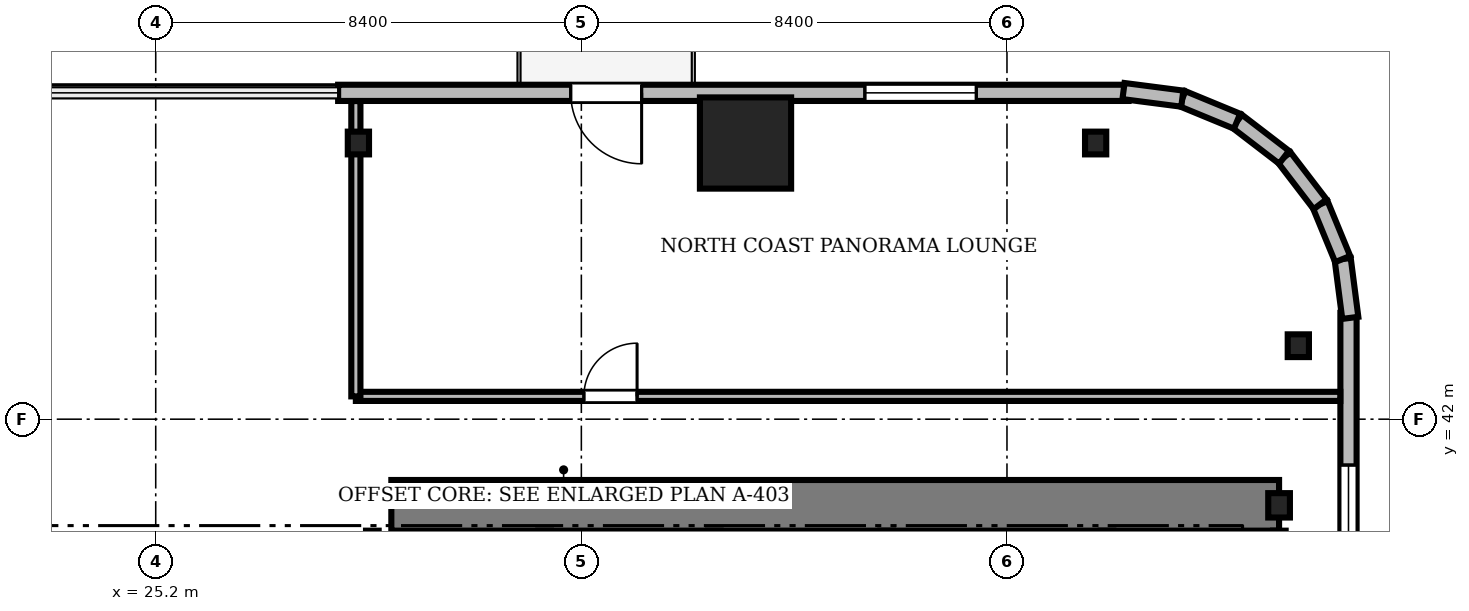
"""IFC4 building model, lengths in metres.
Left out: names, types, materials, properties, quantities, classifications, styles, units other than length and angle.
Written with IfcOpenShell. Run it as: python <this file> out.ifc"""

import sys

from ifc_helpers import new_model, si_unit, direction, frame, frame_2d, origin, origin_2d, place, context, subcontext, project, spatial, rectangle, i_section, extrude, source, transform, mapped, element, fill, save


model = new_model("IFC4")
c1 = context("Model", 3, precision=1e-05, world=origin(), true_north=direction((0.0, 1.0)))
c2 = subcontext(c1, "Body", "Model", "MODEL_VIEW")
j1 = project(units=[si_unit("LENGTHUNIT", "METRE"), si_unit("PLANEANGLEUNIT", "RADIAN")], contexts=[c1])
p1 = place(None, origin())
s1 = spatial("IfcSite", under=j1, at=p1, CompositionType="ELEMENT")
p2 = place(p1, origin())
s2 = spatial("IfcBuilding", under=s1, at=p2, CompositionType="ELEMENT")
p3 = place(p2, frame((0.0, 0.0, 31.25)))
s3 = spatial("IfcBuildingStorey", under=s2, at=p3, CompositionType="ELEMENT", Elevation=31.25)
m1 = source(origin(), c2, "Body", "SweptSolid", [
    extrude(rectangle(XDim=17.52, YDim=1.0, at=frame_2d((8.76, 0.0))), origin(), (0.0, 0.0, 1.0), 3.41),
])
p4 = place(p3, frame((29.85, 40.3, 0.0), z_axis=(0.0, 0.0, 1.0), x_axis=(1.0, 0.0, 0.0)))
e1 = element("IfcWall", 1, at=p4, inside=s3, PredefinedType="SHEAR", context=c2, shape_type="MappedRepresentation", body=[
    mapped(m1, transform((0.0, 0.0, 0.0), scale=1.0)),
])
m2 = source(origin(), c2, "Body", "SweptSolid", [
    extrude(i_section(OverallWidth=0.428, OverallDepth=0.481, WebThickness=0.04, FlangeThickness=0.063, FilletRadius=0.015, at=origin_2d()), origin(), (0.0, 0.0, 1.0), 3.41),
])
p5 = place(p3, frame((47.37, 40.3, 0.0), z_axis=(0.0, 0.0, 1.0), x_axis=(1.0, 0.0, 0.0)))
e2 = element("IfcColumn", 2, at=p5, inside=s3, PredefinedType="COLUMN", context=c2, shape_type="MappedRepresentation", body=[
    mapped(m2, transform((0.0, 0.0, 0.0), scale=1.0)),
])
m3 = source(origin(), c2, "Body", "SweptSolid", [
    extrude(rectangle(XDim=1.8, YDim=1.8, at=origin_2d()), origin(), (0.0, 0.0, 1.0), 3.41),
])
p6 = place(p3, frame((36.84, 47.45, 0.0), z_axis=(0.0, 0.0, 1.0), x_axis=(1.0, 0.0, 0.0)))
e3 = element("IfcColumn", 3, at=p6, inside=s3, PredefinedType="COLUMN", context=c2, shape_type="MappedRepresentation", body=[
    mapped(m3, transform((0.0, 0.0, 0.0), scale=1.0)),
])
m4 = source(origin(), c2, "Body", "SweptSolid", [
    extrude(i_section(OverallWidth=0.419, OverallDepth=0.449, WebThickness=0.031, FlangeThickness=0.048, FilletRadius=0.015, at=origin_2d()), origin(), (0.0, 0.0, 1.0), 3.41),
])
for number, where, z_axis, x_axis in (
    (4, (47.75, 43.45, 0.0), (0.0, 0.0, 1.0), (1.0, 0.0, 0.0)),
    (5, (43.75, 47.45, 0.0), (0.0, 0.0, 1.0), (1.0, 0.0, 0.0)),
    (6, (29.2, 47.45, 0.0), (0.0, 0.0, 1.0), (1.0, 0.0, 0.0)),
):
    element("IfcColumn", number, at=place(p3, frame(where, z_axis=z_axis, x_axis=x_axis)), inside=s3, PredefinedType="COLUMN", context=c2, shape_type="MappedRepresentation", body=[
        mapped(m4, transform((0.0, 0.0, 0.0), scale=1.0)),
    ])
m5 = source(origin(), c2, "Body", "SweptSolid", [
    extrude(rectangle(XDim=15.6, YDim=0.32, at=frame_2d((7.8, 0.0))), origin(), (0.0, 0.0, 1.0), 3.41),
])
p7 = place(p3, frame((44.4, 48.44, 0.0), z_axis=(0.0, 0.0, 1.0), x_axis=(-1.0, 0.0, 0.0)))
e7 = element("IfcWall", 7, at=p7, inside=s3, PredefinedType="SOLIDWALL", context=c2, shape_type="MappedRepresentation", body=[
    mapped(m5, transform((0.0, 0.0, 0.0), scale=1.0)),
])
m6 = source(origin(), c2, "Body", "SweptSolid", [
    extrude(rectangle(XDim=1.4, YDim=2.3, at=frame_2d((0.7, 1.15))), frame((0.0, 0.17, 0.0), z_axis=(0.0, -1.0, 0.0), x_axis=(1.0, 0.0, 0.0)), (0.0, 0.0, 1.0), 0.34),
])
p8 = place(p7, frame((9.61, 0.0, 0.0)))
e8 = element("IfcOpeningElement", 8, at=p8, cuts=e7, PredefinedType="OPENING", context=c2, shape_type="MappedRepresentation", body=[
    mapped(m6, transform((0.0, 0.0, 0.0), scale=1.0)),
])
m7 = source(origin(), c2, "Body", "SweptSolid", [
    extrude(rectangle(XDim=2.2, YDim=2.4, at=frame_2d((1.1, 1.2))), frame((0.0, 0.17, 0.0), z_axis=(0.0, -1.0, 0.0), x_axis=(1.0, 0.0, 0.0)), (0.0, 0.0, 1.0), 0.34),
])
p9 = place(p7, frame((3.005, 0.0, 0.72)))
e9 = element("IfcOpeningElement", 9, at=p9, cuts=e7, PredefinedType="OPENING", context=c2, shape_type="MappedRepresentation", body=[
    mapped(m7, transform((0.0, 0.0, 0.0), scale=1.0)),
])
m8 = source(origin(), c2, "Body", "SweptSolid", [
    extrude(rectangle(XDim=15.6, YDim=0.32, at=frame_2d((7.8, 0.0))), origin(), (0.0, 0.0, 1.0), 3.41),
])
p10 = place(p3, frame((48.74, 28.5, 0.0), z_axis=(0.0, 0.0, 1.0), x_axis=(0.0, 1.0, 0.0)))
e10 = element("IfcWall", 10, at=p10, inside=s3, PredefinedType="SOLIDWALL", context=c2, shape_type="MappedRepresentation", body=[
    mapped(m8, transform((0.0, 0.0, 0.0), scale=1.0)),
])
p11 = place(p10, frame((10.395, 0.0, 0.72)))
e11 = element("IfcOpeningElement", 11, at=p11, cuts=e10, PredefinedType="OPENING", context=c2, shape_type="MappedRepresentation", body=[
    mapped(m7, transform((0.0, 0.0, 0.0), scale=1.0)),
])
m9 = source(origin(), c2, "Body", "SweptSolid", [
    extrude(rectangle(XDim=1.17, YDim=0.32, at=frame_2d((0.585, 0.0))), origin(), (0.0, 0.0, 1.0), 3.41),
])
p12 = place(p3, frame((48.776, 44.0, 0.0), z_axis=(0.0, 0.0, 1.0), x_axis=(-0.128295670475, 0.991735963317, 0.0)))
e12 = element("IfcWall", 12, at=p12, inside=s3, PredefinedType="SOLIDWALL", context=c2, shape_type="MappedRepresentation", body=[
    mapped(m9, transform((0.0, 0.0, 0.0), scale=1.0)),
])
m10 = source(origin(), c2, "Body", "SweptSolid", [
    extrude(rectangle(XDim=1.169, YDim=0.32, at=frame_2d((0.584, 0.0))), origin(), (0.0, 0.0, 1.0), 3.41),
])
p13 = place(p3, frame((48.625, 45.16, 0.0), z_axis=(0.0, 0.0, 1.0), x_axis=(-0.381054331552, 0.924552646638, 0.0)))
e13 = element("IfcWall", 13, at=p13, inside=s3, PredefinedType="SOLIDWALL", context=c2, shape_type="MappedRepresentation", body=[
    mapped(m10, transform((0.0, 0.0, 0.0), scale=1.0)),
])
m11 = source(origin(), c2, "Body", "SweptSolid", [
    extrude(rectangle(XDim=1.169, YDim=0.32, at=frame_2d((0.584, 0.0))), origin(), (0.0, 0.0, 1.0), 3.41),
])
p14 = place(p3, frame((48.18, 46.241, 0.0), z_axis=(0.0, 0.0, 1.0), x_axis=(-0.608387696831, 0.793639975269, 0.0)))
e14 = element("IfcWall", 14, at=p14, inside=s3, PredefinedType="SOLIDWALL", context=c2, shape_type="MappedRepresentation", body=[
    mapped(m11, transform((0.0, 0.0, 0.0), scale=1.0)),
])
m12 = source(origin(), c2, "Body", "SweptSolid", [
    extrude(rectangle(XDim=1.169, YDim=0.32, at=frame_2d((0.584, 0.0))), origin(), (0.0, 0.0, 1.0), 3.41),
])
p15 = place(p3, frame((47.469, 47.169, 0.0), z_axis=(0.0, 0.0, 1.0), x_axis=(-0.793663520347, 0.608356981114, 0.0)))
e15 = element("IfcWall", 15, at=p15, inside=s3, PredefinedType="SOLIDWALL", context=c2, shape_type="MappedRepresentation", body=[
    mapped(m12, transform((0.0, 0.0, 0.0), scale=1.0)),
])
p16 = place(p3, frame((46.541, 47.88, 0.0), z_axis=(0.0, 0.0, 1.0), x_axis=(-0.924552646638, 0.381054331552, 0.0)))
e16 = element("IfcWall", 16, at=p16, inside=s3, PredefinedType="SOLIDWALL", context=c2, shape_type="MappedRepresentation", body=[
    mapped(m10, transform((0.0, 0.0, 0.0), scale=1.0)),
])
p17 = place(p3, frame((45.46, 48.325, 0.0), z_axis=(0.0, 0.0, 1.0), x_axis=(-0.991735963317, 0.128295670475, 0.0)))
e17 = element("IfcWall", 17, at=p17, inside=s3, PredefinedType="SOLIDWALL", context=c2, shape_type="MappedRepresentation", body=[
    mapped(m9, transform((0.0, 0.0, 0.0), scale=1.0)),
])
m13 = source(origin(), c2, "Body", "SweptSolid", [
    extrude(rectangle(XDim=9.15, YDim=0.25, at=frame_2d((4.575, 0.0))), origin(), (0.0, 0.0, 1.0), 3.45),
])
for number, where, z_axis, x_axis in (
    (18, (29.475, 30.65, 0.0), (0.0, 0.0, 1.0), (0.0, 1.0, 0.0)),
    (19, (32.875, 30.65, 0.0), (0.0, 0.0, 1.0), (0.0, 1.0, 0.0)),
    (20, (36.225, 30.65, 0.0), (0.0, 0.0, 1.0), (0.0, 1.0, 0.0)),
    (21, (39.625, 30.65, 0.0), (0.0, 0.0, 1.0), (0.0, 1.0, 0.0)),
    (22, (43.975, 30.65, 0.0), (0.0, 0.0, 1.0), (0.0, 1.0, 0.0)),
    (23, (47.375, 30.65, 0.0), (0.0, 0.0, 1.0), (0.0, 1.0, 0.0)),
):
    element("IfcWall", number, at=place(p3, frame(where, z_axis=z_axis, x_axis=x_axis)), inside=s3, PredefinedType="SOLIDWALL", context=c2, shape_type="MappedRepresentation", body=[
        mapped(m13, transform((0.0, 0.0, 0.0), scale=1.0)),
    ])
m14 = source(origin(), c2, "Body", "SweptSolid", [
    extrude(rectangle(XDim=19.428, YDim=0.18, at=frame_2d((9.714, 0.0))), origin(), (0.0, 0.0, 1.0), 2.652),
])
p18 = place(p3, frame((29.15, 42.45, 0.0), z_axis=(0.0, 0.0, 1.0), x_axis=(1.0, 0.0, 0.0)))
e24 = element("IfcWall", 24, at=p18, inside=s3, PredefinedType="PARTITIONING", context=c2, shape_type="MappedRepresentation", body=[
    mapped(m14, transform((0.0, 0.0, 0.0), scale=1.0)),
])
m15 = source(origin(), c2, "Body", "SweptSolid", [
    extrude(rectangle(XDim=1.05, YDim=2.2, at=frame_2d((0.525, 1.1))), frame((0.0, 0.1, 0.0), z_axis=(0.0, -1.0, 0.0), x_axis=(1.0, 0.0, 0.0)), (0.0, 0.0, 1.0), 0.2),
])
p19 = place(p18, frame((4.5, 0.0, 0.0)))
e25 = element("IfcOpeningElement", 25, at=p19, cuts=e24, PredefinedType="OPENING", context=c2, shape_type="MappedRepresentation", body=[
    mapped(m15, transform((0.0, 0.0, 0.0), scale=1.0)),
])
m16 = source(origin(), c2, "Body", "SweptSolid", [
    extrude(rectangle(XDim=5.828, YDim=0.18, at=frame_2d((2.914, 0.0))), origin(), (0.0, 0.0, 1.0), 2.652),
])
p20 = place(p3, frame((29.15, 42.45, 0.0), z_axis=(0.0, 0.0, 1.0), x_axis=(0.0, 1.0, 0.0)))
e26 = element("IfcWall", 26, at=p20, inside=s3, PredefinedType="PARTITIONING", context=c2, shape_type="MappedRepresentation", body=[
    mapped(m16, transform((0.0, 0.0, 0.0), scale=1.0)),
])
m17 = source(origin(), c2, "Body", "SweptSolid", [
    extrude(rectangle(XDim=1.4, YDim=2.3, at=frame_2d((0.7, 1.15))), frame((0.0, 0.025, 0.0), z_axis=(0.0, -1.0, 0.0), x_axis=(1.0, 0.0, 0.0)), (0.0, 0.0, 1.0), 0.05),
])
p21 = place(p8, frame((1.4, 0.0, 0.0), z_axis=(0.0, 0.0, 1.0), x_axis=(-1.0, 0.0, 0.0)))
e27 = element("IfcDoor", 27, at=p21, inside=s3, OperationType="DOUBLE_DOOR_SLIDING", PredefinedType="DOOR", context=c2, shape_type="MappedRepresentation", body=[
    mapped(m17, transform((0.0, 0.0, 0.0), scale=1.0)),
])
fill(e8, e27)
m18 = source(origin(), c2, "Body", "SweptSolid", [
    extrude(rectangle(XDim=2.2, YDim=2.4, at=frame_2d((1.1, 1.2))), frame((0.0, 0.03, 0.0), z_axis=(0.0, -1.0, 0.0), x_axis=(1.0, 0.0, 0.0)), (0.0, 0.0, 1.0), 0.06),
])
p22 = place(p9, origin())
e28 = element("IfcWindow", 28, at=p22, inside=s3, PartitioningType="SINGLE_PANEL", PredefinedType="WINDOW", context=c2, shape_type="MappedRepresentation", body=[
    mapped(m18, transform((0.0, 0.0, 0.0), scale=1.0)),
])
fill(e9, e28)
p23 = place(p11, origin())
e29 = element("IfcWindow", 29, at=p23, inside=s3, PartitioningType="SINGLE_PANEL", PredefinedType="WINDOW", context=c2, shape_type="MappedRepresentation", body=[
    mapped(m18, transform((0.0, 0.0, 0.0), scale=1.0)),
])
fill(e11, e29)
m19 = source(origin(), c2, "Body", "SweptSolid", [
    extrude(rectangle(XDim=1.05, YDim=2.2, at=frame_2d((0.525, 1.1))), frame((0.0, 0.025, 0.0), z_axis=(0.0, -1.0, 0.0), x_axis=(1.0, 0.0, 0.0)), (0.0, 0.0, 1.0), 0.05),
])
p24 = place(p19, origin())
e30 = element("IfcDoor", 30, at=p24, inside=s3, OperationType="SINGLE_SWING_RIGHT", PredefinedType="DOOR", context=c2, shape_type="MappedRepresentation", body=[
    mapped(m19, transform((0.0, 0.0, 0.0), scale=1.0)),
])
fill(e25, e30)
save(model, sys.argv[1])
